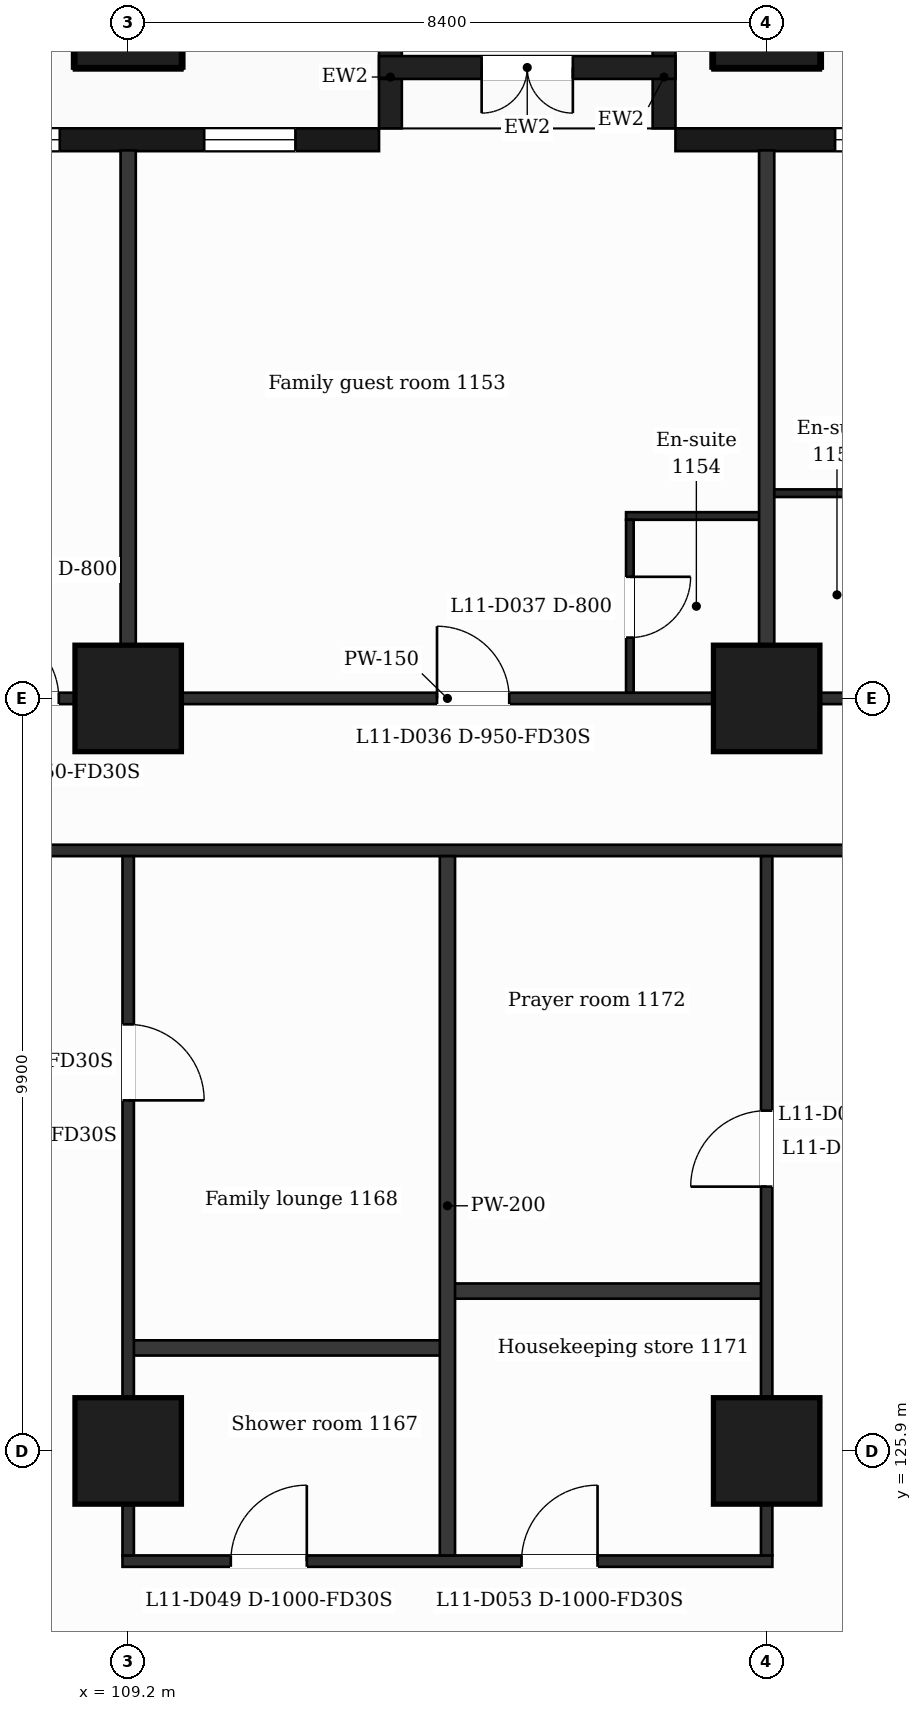
"""IFC4 building model, lengths in metres.
Left out: names, types, materials, properties, quantities, classifications, styles, units other than length and angle.
Written with IfcOpenShell. Run it as: python <this file> out.ifc"""

import sys

from ifc_helpers import new_model, si_unit, direction, frame, frame_2d, origin, origin_2d, place, context, subcontext, project, spatial, rectangle, extrude, element, fill, save


model = new_model("IFC4")
c1 = context("Model", 3, precision=1e-05, world=origin(), true_north=direction((0.0, 1.0)))
c2 = subcontext(c1, "Body", "Model", "MODEL_VIEW")
j1 = project(units=[si_unit("LENGTHUNIT", "METRE"), si_unit("PLANEANGLEUNIT", "RADIAN")], contexts=[c1])
p1 = place(None, origin())
s1 = spatial("IfcSite", under=j1, at=p1, CompositionType="ELEMENT")
p2 = place(p1, origin())
s2 = spatial("IfcBuilding", under=s1, at=p2, CompositionType="ELEMENT")
p3 = place(p2, frame((0.0, 0.0, 56.5)))
s3 = spatial("IfcBuildingStorey", under=s2, at=p3, CompositionType="ELEMENT", Elevation=56.5)
for number, where, z_axis, x_axis in (
    (1, (109.2, 125.9, 0.0), (0.0, 0.0, 1.0), (1.0, 0.0, 0.0)),
    (2, (117.6, 125.9, 0.0), (0.0, 0.0, 1.0), (1.0, 0.0, 0.0)),
    (3, (109.2, 135.8, 0.0), (0.0, 0.0, 1.0), (1.0, 0.0, 0.0)),
    (4, (117.6, 135.8, 0.0), (0.0, 0.0, 1.0), (1.0, 0.0, 0.0)),
    (5, (109.2, 144.8, 0.0), (0.0, 0.0, 1.0), (1.0, 0.0, 0.0)),
    (6, (117.6, 144.8, 0.0), (0.0, 0.0, 1.0), (1.0, 0.0, 0.0)),
):
    element("IfcColumn", number, at=place(p3, frame(where, z_axis=z_axis, x_axis=x_axis)), inside=s3, PredefinedType="COLUMN", context=c2, shape_type="SweptSolid", body=[
        extrude(rectangle(XDim=1.4, YDim=1.4, at=origin_2d()), origin(), (0.0, 0.0, 1.0), 3.5),
    ])
p4 = place(p3, frame((130.65, 143.15, 0.0), z_axis=(0.0, 0.0, 1.0), x_axis=(-1.0, 0.0, 0.0)))
e7 = element("IfcWall", 7, at=p4, inside=s3, PredefinedType="SOLIDWALL", context=c2, shape_type="SweptSolid", body=[
    extrude(rectangle(XDim=14.25, YDim=0.3, at=frame_2d((7.125, 0.0))), origin(), (0.0, 0.0, 1.0), 3.18),
])
p5 = place(p4, frame((1.35, 0.0, 0.9)))
e8 = element("IfcOpeningElement", 8, at=p5, cuts=e7, PredefinedType="OPENING", context=c2, shape_type="SweptSolid", body=[
    extrude(rectangle(XDim=2.4, YDim=2.1, at=frame_2d((1.2, 1.05))), frame((0.0, 0.16, 0.0), z_axis=(0.0, -1.0, 0.0), x_axis=(1.0, 0.0, 0.0)), (0.0, 0.0, 1.0), 0.32),
])
p6 = place(p4, frame((6.15, 0.0, 0.0)))
e9 = element("IfcOpeningElement", 9, at=p6, cuts=e7, PredefinedType="OPENING", context=c2, shape_type="SweptSolid", body=[
    extrude(rectangle(XDim=1.2, YDim=2.4, at=frame_2d((0.6, 1.2))), frame((0.0, 0.16, 0.0), z_axis=(0.0, -1.0, 0.0), x_axis=(1.0, 0.0, 0.0)), (0.0, 0.0, 1.0), 0.32),
])
p7 = place(p4, frame((9.75, 0.0, 0.9)))
e10 = element("IfcOpeningElement", 10, at=p7, cuts=e7, PredefinedType="OPENING", context=c2, shape_type="SweptSolid", body=[
    extrude(rectangle(XDim=2.4, YDim=2.1, at=frame_2d((1.2, 1.05))), frame((0.0, 0.16, 0.0), z_axis=(0.0, -1.0, 0.0), x_axis=(1.0, 0.0, 0.0)), (0.0, 0.0, 1.0), 0.32),
])
p8 = place(p3, frame((112.5, 143.15, 0.0), z_axis=(0.0, 0.0, 1.0), x_axis=(-1.0, 0.0, 0.0)))
e11 = element("IfcWall", 11, at=p8, inside=s3, PredefinedType="SOLIDWALL", context=c2, shape_type="SweptSolid", body=[
    extrude(rectangle(XDim=16.5, YDim=0.3, at=frame_2d((8.25, 0.0))), origin(), (0.0, 0.0, 1.0), 3.18),
])
p9 = place(p8, frame((1.1, 0.0, 0.9)))
e12 = element("IfcOpeningElement", 12, at=p9, cuts=e11, PredefinedType="OPENING", context=c2, shape_type="SweptSolid", body=[
    extrude(rectangle(XDim=1.2, YDim=2.1, at=frame_2d((0.6, 1.05))), frame((0.0, 0.16, 0.0), z_axis=(0.0, -1.0, 0.0), x_axis=(1.0, 0.0, 0.0)), (0.0, 0.0, 1.0), 0.32),
])
p10 = place(p8, frame((4.2, 0.0, 0.9)))
e13 = element("IfcOpeningElement", 13, at=p10, cuts=e11, PredefinedType="OPENING", context=c2, shape_type="SweptSolid", body=[
    extrude(rectangle(XDim=2.4, YDim=2.1, at=frame_2d((1.2, 1.05))), frame((0.0, 0.16, 0.0), z_axis=(0.0, -1.0, 0.0), x_axis=(1.0, 0.0, 0.0)), (0.0, 0.0, 1.0), 0.32),
])
p11 = place(p8, frame((9.0, 0.0, 0.0)))
e14 = element("IfcOpeningElement", 14, at=p11, cuts=e11, PredefinedType="OPENING", context=c2, shape_type="SweptSolid", body=[
    extrude(rectangle(XDim=1.2, YDim=2.4, at=frame_2d((0.6, 1.2))), frame((0.0, 0.16, 0.0), z_axis=(0.0, -1.0, 0.0), x_axis=(1.0, 0.0, 0.0)), (0.0, 0.0, 1.0), 0.32),
])
p12 = place(p8, frame((12.3, 0.0, 0.9)))
e15 = element("IfcOpeningElement", 15, at=p12, cuts=e11, PredefinedType="OPENING", context=c2, shape_type="SweptSolid", body=[
    extrude(rectangle(XDim=1.2, YDim=2.1, at=frame_2d((0.6, 1.05))), frame((0.0, 0.16, 0.0), z_axis=(0.0, -1.0, 0.0), x_axis=(1.0, 0.0, 0.0)), (0.0, 0.0, 1.0), 0.32),
])
p13 = place(p8, frame((14.1, 0.0, 0.9)))
e16 = element("IfcOpeningElement", 16, at=p13, cuts=e11, PredefinedType="OPENING", context=c2, shape_type="SweptSolid", body=[
    extrude(rectangle(XDim=1.2, YDim=2.1, at=frame_2d((0.6, 1.05))), frame((0.0, 0.16, 0.0), z_axis=(0.0, -1.0, 0.0), x_axis=(1.0, 0.0, 0.0)), (0.0, 0.0, 1.0), 0.32),
])
for number, where, z_axis, x_axis in (
    (17, (116.25, 143.3, 0.0), (0.0, 0.0, 1.0), (0.0, 1.0, 0.0)),
    (18, (112.65, 143.3, 0.0), (0.0, 0.0, 1.0), (0.0, 1.0, 0.0)),
):
    element("IfcWall", number, at=place(p3, frame(where, z_axis=z_axis, x_axis=x_axis)), inside=s3, PredefinedType="SOLIDWALL", context=c2, shape_type="SweptSolid", body=[
        extrude(rectangle(XDim=1.35, YDim=0.3, at=frame_2d((0.675, 0.0))), origin(), (0.0, 0.0, 1.0), 3.18),
    ])
p14 = place(p3, frame((116.4, 144.1, 0.0), z_axis=(0.0, 0.0, 1.0), x_axis=(-1.0, 0.0, 0.0)))
e19 = element("IfcWall", 19, at=p14, inside=s3, PredefinedType="SOLIDWALL", context=c2, shape_type="SweptSolid", body=[
    extrude(rectangle(XDim=3.9, YDim=0.3, at=frame_2d((1.95, 0.0))), origin(), (0.0, 0.0, 1.0), 3.18),
])
p15 = place(p14, frame((1.35, 0.0, 0.0)))
e20 = element("IfcOpeningElement", 20, at=p15, cuts=e19, PredefinedType="OPENING", context=c2, shape_type="SweptSolid", body=[
    extrude(rectangle(XDim=1.2, YDim=2.4, at=frame_2d((0.6, 1.2))), frame((0.0, 0.16, 0.0), z_axis=(0.0, -1.0, 0.0), x_axis=(1.0, 0.0, 0.0)), (0.0, 0.0, 1.0), 0.32),
])
p16 = place(p3, frame((109.125, 124.45, 0.0), z_axis=(0.0, 0.0, 1.0), x_axis=(1.0, 0.0, 0.0)))
e21 = element("IfcWall", 21, at=p16, inside=s3, PredefinedType="PARTITIONING", context=c2, shape_type="SweptSolid", body=[
    extrude(rectangle(XDim=8.55, YDim=0.15, at=frame_2d((4.275, 0.0))), origin(), (0.0, 0.0, 1.0), 3.18),
])
p17 = place(p16, frame((1.425, 0.0, 0.0)))
e22 = element("IfcOpeningElement", 22, at=p17, cuts=e21, PredefinedType="OPENING", context=c2, shape_type="SweptSolid", body=[
    extrude(rectangle(XDim=1.0, YDim=2.1, at=frame_2d((0.5, 1.05))), frame((0.0, 0.085, 0.0), z_axis=(0.0, -1.0, 0.0), x_axis=(1.0, 0.0, 0.0)), (0.0, 0.0, 1.0), 0.17),
])
p18 = place(p16, frame((5.25, 0.0, 0.0)))
e23 = element("IfcOpeningElement", 23, at=p18, cuts=e21, PredefinedType="OPENING", context=c2, shape_type="SweptSolid", body=[
    extrude(rectangle(XDim=1.0, YDim=2.1, at=frame_2d((0.5, 1.05))), frame((0.0, 0.085, 0.0), z_axis=(0.0, -1.0, 0.0), x_axis=(1.0, 0.0, 0.0)), (0.0, 0.0, 1.0), 0.17),
])
p19 = place(p3, frame((109.2, 127.255, 0.0), z_axis=(0.0, 0.0, 1.0), x_axis=(1.0, 0.0, 0.0)))
e24 = element("IfcWall", 24, at=p19, inside=s3, PredefinedType="PARTITIONING", context=c2, shape_type="SweptSolid", body=[
    extrude(rectangle(XDim=4.2, YDim=0.2, at=frame_2d((2.1, 0.0))), origin(), (0.0, 0.0, 1.0), 3.18),
])
p20 = place(p3, frame((113.4, 128.003, 0.0), z_axis=(0.0, 0.0, 1.0), x_axis=(1.0, 0.0, 0.0)))
e25 = element("IfcWall", 25, at=p20, inside=s3, PredefinedType="PARTITIONING", context=c2, shape_type="SweptSolid", body=[
    extrude(rectangle(XDim=4.2, YDim=0.2, at=frame_2d((2.1, 0.0))), origin(), (0.0, 0.0, 1.0), 3.18),
])
p21 = place(p3, frame((100.725, 133.8, 0.0), z_axis=(0.0, 0.0, 1.0), x_axis=(1.0, 0.0, 0.0)))
e26 = element("IfcWall", 26, at=p21, inside=s3, PredefinedType="PARTITIONING", context=c2, shape_type="SweptSolid", body=[
    extrude(rectangle(XDim=25.35, YDim=0.15, at=frame_2d((12.675, 0.0))), origin(), (0.0, 0.0, 1.0), 3.18),
])
p22 = place(p3, frame((90.895, 135.8, 0.0), z_axis=(0.0, 0.0, 1.0), x_axis=(1.0, 0.0, 0.0)))
e27 = element("IfcWall", 27, at=p22, inside=s3, PredefinedType="PARTITIONING", context=c2, shape_type="SweptSolid", body=[
    extrude(rectangle(XDim=45.011, YDim=0.15, at=frame_2d((22.505, 0.0))), origin(), (0.0, 0.0, 1.0), 3.18),
])
p23 = place(p22, frame((7.675, 0.0, 0.0)))
e28 = element("IfcOpeningElement", 28, at=p23, cuts=e27, PredefinedType="OPENING", context=c2, shape_type="SweptSolid", body=[
    extrude(rectangle(XDim=1.0, YDim=2.1, at=frame_2d((0.5, 1.05))), frame((0.0, 0.085, 0.0), z_axis=(0.0, -1.0, 0.0), x_axis=(1.0, 0.0, 0.0)), (0.0, 0.0, 1.0), 0.17),
])
p24 = place(p22, frame((10.892, 0.0, 0.0)))
e29 = element("IfcOpeningElement", 29, at=p24, cuts=e27, PredefinedType="OPENING", context=c2, shape_type="SweptSolid", body=[
    extrude(rectangle(XDim=0.95, YDim=2.1, at=frame_2d((0.475, 1.05))), frame((0.0, 0.085, 0.0), z_axis=(0.0, -1.0, 0.0), x_axis=(1.0, 0.0, 0.0)), (0.0, 0.0, 1.0), 0.17),
])
p25 = place(p22, frame((16.442, 0.0, 0.0)))
e30 = element("IfcOpeningElement", 30, at=p25, cuts=e27, PredefinedType="OPENING", context=c2, shape_type="SweptSolid", body=[
    extrude(rectangle(XDim=0.95, YDim=2.1, at=frame_2d((0.475, 1.05))), frame((0.0, 0.085, 0.0), z_axis=(0.0, -1.0, 0.0), x_axis=(1.0, 0.0, 0.0)), (0.0, 0.0, 1.0), 0.17),
])
p26 = place(p22, frame((22.368, 0.0, 0.0)))
e31 = element("IfcOpeningElement", 31, at=p26, cuts=e27, PredefinedType="OPENING", context=c2, shape_type="SweptSolid", body=[
    extrude(rectangle(XDim=0.95, YDim=2.1, at=frame_2d((0.475, 1.05))), frame((0.0, 0.085, 0.0), z_axis=(0.0, -1.0, 0.0), x_axis=(1.0, 0.0, 0.0)), (0.0, 0.0, 1.0), 0.17),
])
p27 = place(p22, frame((31.825, 0.0, 0.0)))
e32 = element("IfcOpeningElement", 32, at=p27, cuts=e27, PredefinedType="OPENING", context=c2, shape_type="SweptSolid", body=[
    extrude(rectangle(XDim=0.95, YDim=2.1, at=frame_2d((0.475, 1.05))), frame((0.0, 0.085, 0.0), z_axis=(0.0, -1.0, 0.0), x_axis=(1.0, 0.0, 0.0)), (0.0, 0.0, 1.0), 0.17),
])
p28 = place(p22, frame((36.775, 0.0, 0.0)))
e33 = element("IfcOpeningElement", 33, at=p28, cuts=e27, PredefinedType="OPENING", context=c2, shape_type="SweptSolid", body=[
    extrude(rectangle(XDim=1.0, YDim=2.1, at=frame_2d((0.5, 1.05))), frame((0.0, 0.085, 0.0), z_axis=(0.0, -1.0, 0.0), x_axis=(1.0, 0.0, 0.0)), (0.0, 0.0, 1.0), 0.17),
])
p29 = place(p3, frame((115.75, 138.2, 0.0), z_axis=(0.0, 0.0, 1.0), x_axis=(1.0, 0.0, 0.0)))
e34 = element("IfcWall", 34, at=p29, inside=s3, PredefinedType="PARTITIONING", context=c2, shape_type="SweptSolid", body=[
    extrude(rectangle(XDim=1.85, YDim=0.1, at=frame_2d((0.925, 0.0))), origin(), (0.0, 0.0, 1.0), 3.18),
])
p30 = place(p3, frame((117.6, 138.5, 0.0), z_axis=(0.0, 0.0, 1.0), x_axis=(1.0, 0.0, 0.0)))
e35 = element("IfcWall", 35, at=p30, inside=s3, PredefinedType="PARTITIONING", context=c2, shape_type="SweptSolid", body=[
    extrude(rectangle(XDim=1.85, YDim=0.1, at=frame_2d((0.925, 0.0))), origin(), (0.0, 0.0, 1.0), 3.18),
])
p31 = place(p3, frame((109.2, 135.875, 0.0), z_axis=(0.0, 0.0, 1.0), x_axis=(0.0, 1.0, 0.0)))
e36 = element("IfcWall", 36, at=p31, inside=s3, PredefinedType="PARTITIONING", context=c2, shape_type="SweptSolid", body=[
    extrude(rectangle(XDim=7.135, YDim=0.2, at=frame_2d((3.567, 0.0))), origin(), (0.0, 0.0, 1.0), 3.18),
])
p32 = place(p3, frame((109.2, 124.525, 0.0), z_axis=(0.0, 0.0, 1.0), x_axis=(0.0, 1.0, 0.0)))
e37 = element("IfcWall", 37, at=p32, inside=s3, PredefinedType="PARTITIONING", context=c2, shape_type="SweptSolid", body=[
    extrude(rectangle(XDim=9.2, YDim=0.15, at=frame_2d((4.6, 0.0))), origin(), (0.0, 0.0, 1.0), 3.18),
])
p33 = place(p32, frame((5.987, 0.0, 0.0)))
e38 = element("IfcOpeningElement", 38, at=p33, cuts=e37, PredefinedType="OPENING", context=c2, shape_type="SweptSolid", body=[
    extrude(rectangle(XDim=1.0, YDim=2.1, at=frame_2d((0.5, 1.05))), frame((0.0, 0.085, 0.0), z_axis=(0.0, -1.0, 0.0), x_axis=(1.0, 0.0, 0.0)), (0.0, 0.0, 1.0), 0.17),
])
p34 = place(p3, frame((113.4, 124.525, 0.0), z_axis=(0.0, 0.0, 1.0), x_axis=(0.0, 1.0, 0.0)))
e39 = element("IfcWall", 39, at=p34, inside=s3, PredefinedType="PARTITIONING", context=c2, shape_type="SweptSolid", body=[
    extrude(rectangle(XDim=9.2, YDim=0.2, at=frame_2d((4.6, 0.0))), origin(), (0.0, 0.0, 1.0), 3.18),
])
p35 = place(p3, frame((115.8, 135.875, 0.0), z_axis=(0.0, 0.0, 1.0), x_axis=(0.0, 1.0, 0.0)))
e40 = element("IfcWall", 40, at=p35, inside=s3, PredefinedType="PARTITIONING", context=c2, shape_type="SweptSolid", body=[
    extrude(rectangle(XDim=2.275, YDim=0.1, at=frame_2d((1.137, 0.0))), origin(), (0.0, 0.0, 1.0), 3.18),
])
p36 = place(p35, frame((0.725, 0.0, 0.0)))
e41 = element("IfcOpeningElement", 41, at=p36, cuts=e40, PredefinedType="OPENING", context=c2, shape_type="SweptSolid", body=[
    extrude(rectangle(XDim=0.8, YDim=2.1, at=frame_2d((0.4, 1.05))), frame((0.0, 0.06, 0.0), z_axis=(0.0, -1.0, 0.0), x_axis=(1.0, 0.0, 0.0)), (0.0, 0.0, 1.0), 0.12),
])
p37 = place(p3, frame((117.6, 135.875, 0.0), z_axis=(0.0, 0.0, 1.0), x_axis=(0.0, 1.0, 0.0)))
e42 = element("IfcWall", 42, at=p37, inside=s3, PredefinedType="PARTITIONING", context=c2, shape_type="SweptSolid", body=[
    extrude(rectangle(XDim=7.135, YDim=0.2, at=frame_2d((3.567, 0.0))), origin(), (0.0, 0.0, 1.0), 3.18),
])
p38 = place(p3, frame((117.6, 124.525, 0.0), z_axis=(0.0, 0.0, 1.0), x_axis=(0.0, 1.0, 0.0)))
e43 = element("IfcWall", 43, at=p38, inside=s3, PredefinedType="PARTITIONING", context=c2, shape_type="SweptSolid", body=[
    extrude(rectangle(XDim=9.2, YDim=0.15, at=frame_2d((4.6, 0.0))), origin(), (0.0, 0.0, 1.0), 3.18),
])
p39 = place(p38, frame((4.852, 0.0, 0.0)))
e44 = element("IfcOpeningElement", 44, at=p39, cuts=e43, PredefinedType="OPENING", context=c2, shape_type="SweptSolid", body=[
    extrude(rectangle(XDim=1.0, YDim=2.1, at=frame_2d((0.5, 1.05))), frame((0.0, 0.085, 0.0), z_axis=(0.0, -1.0, 0.0), x_axis=(1.0, 0.0, 0.0)), (0.0, 0.0, 1.0), 0.17),
])
p40 = place(p7, origin())
e45 = element("IfcWindow", 45, at=p40, inside=s3, PartitioningType="SINGLE_PANEL", PredefinedType="WINDOW", context=c2, shape_type="SweptSolid", body=[
    extrude(rectangle(XDim=2.4, YDim=2.1, at=frame_2d((1.2, 1.05))), frame((0.0, 0.03, 0.0), z_axis=(0.0, -1.0, 0.0), x_axis=(1.0, 0.0, 0.0)), (0.0, 0.0, 1.0), 0.06),
])
fill(e10, e45)
p41 = place(p9, origin())
e46 = element("IfcWindow", 46, at=p41, inside=s3, PartitioningType="SINGLE_PANEL", PredefinedType="WINDOW", context=c2, shape_type="SweptSolid", body=[
    extrude(rectangle(XDim=1.2, YDim=2.1, at=frame_2d((0.6, 1.05))), frame((0.0, 0.03, 0.0), z_axis=(0.0, -1.0, 0.0), x_axis=(1.0, 0.0, 0.0)), (0.0, 0.0, 1.0), 0.06),
])
fill(e12, e46)
p42 = place(p10, origin())
e47 = element("IfcWindow", 47, at=p42, inside=s3, PartitioningType="SINGLE_PANEL", PredefinedType="WINDOW", context=c2, shape_type="SweptSolid", body=[
    extrude(rectangle(XDim=2.4, YDim=2.1, at=frame_2d((1.2, 1.05))), frame((0.0, 0.03, 0.0), z_axis=(0.0, -1.0, 0.0), x_axis=(1.0, 0.0, 0.0)), (0.0, 0.0, 1.0), 0.06),
])
fill(e13, e47)
p43 = place(p15, origin())
e48 = element("IfcDoor", 48, at=p43, inside=s3, OperationType="DOUBLE_DOOR_SINGLE_SWING", PredefinedType="DOOR", context=c2, shape_type="SweptSolid", body=[
    extrude(rectangle(XDim=1.2, YDim=2.4, at=frame_2d((0.6, 1.2))), frame((0.0, 0.025, 0.0), z_axis=(0.0, -1.0, 0.0), x_axis=(1.0, 0.0, 0.0)), (0.0, 0.0, 1.0), 0.05),
])
fill(e20, e48)
p44 = place(p25, origin())
e49 = element("IfcDoor", 49, at=p44, inside=s3, OperationType="SINGLE_SWING_LEFT", PredefinedType="DOOR", context=c2, shape_type="SweptSolid", body=[
    extrude(rectangle(XDim=0.95, YDim=2.1, at=frame_2d((0.475, 1.05))), frame((0.0, 0.025, 0.0), z_axis=(0.0, -1.0, 0.0), x_axis=(1.0, 0.0, 0.0)), (0.0, 0.0, 1.0), 0.05),
])
fill(e30, e49)
p45 = place(p26, origin())
e50 = element("IfcDoor", 50, at=p45, inside=s3, OperationType="SINGLE_SWING_LEFT", PredefinedType="DOOR", context=c2, shape_type="SweptSolid", body=[
    extrude(rectangle(XDim=0.95, YDim=2.1, at=frame_2d((0.475, 1.05))), frame((0.0, 0.025, 0.0), z_axis=(0.0, -1.0, 0.0), x_axis=(1.0, 0.0, 0.0)), (0.0, 0.0, 1.0), 0.05),
])
fill(e31, e50)
p46 = place(p36, origin())
e51 = element("IfcDoor", 51, at=p46, inside=s3, OperationType="SINGLE_SWING_RIGHT", PredefinedType="DOOR", context=c2, shape_type="SweptSolid", body=[
    extrude(rectangle(XDim=0.8, YDim=2.1, at=frame_2d((0.4, 1.05))), frame((0.0, 0.025, 0.0), z_axis=(0.0, -1.0, 0.0), x_axis=(1.0, 0.0, 0.0)), (0.0, 0.0, 1.0), 0.05),
])
fill(e41, e51)
p47 = place(p17, origin())
e52 = element("IfcDoor", 52, at=p47, inside=s3, OperationType="SINGLE_SWING_RIGHT", PredefinedType="DOOR", context=c2, shape_type="SweptSolid", body=[
    extrude(rectangle(XDim=1.0, YDim=2.1, at=frame_2d((0.5, 1.05))), frame((0.0, 0.025, 0.0), z_axis=(0.0, -1.0, 0.0), x_axis=(1.0, 0.0, 0.0)), (0.0, 0.0, 1.0), 0.05),
])
fill(e22, e52)
p48 = place(p33, origin())
e53 = element("IfcDoor", 53, at=p48, inside=s3, OperationType="SINGLE_SWING_LEFT", PredefinedType="DOOR", context=c2, shape_type="SweptSolid", body=[
    extrude(rectangle(XDim=1.0, YDim=2.1, at=frame_2d((0.5, 1.05))), frame((0.0, 0.025, 0.0), z_axis=(0.0, -1.0, 0.0), x_axis=(1.0, 0.0, 0.0)), (0.0, 0.0, 1.0), 0.05),
])
fill(e38, e53)
p49 = place(p18, origin())
e54 = element("IfcDoor", 54, at=p49, inside=s3, OperationType="SINGLE_SWING_RIGHT", PredefinedType="DOOR", context=c2, shape_type="SweptSolid", body=[
    extrude(rectangle(XDim=1.0, YDim=2.1, at=frame_2d((0.5, 1.05))), frame((0.0, 0.025, 0.0), z_axis=(0.0, -1.0, 0.0), x_axis=(1.0, 0.0, 0.0)), (0.0, 0.0, 1.0), 0.05),
])
fill(e23, e54)
p50 = place(p39, origin())
e55 = element("IfcDoor", 55, at=p50, inside=s3, OperationType="SINGLE_SWING_LEFT", PredefinedType="DOOR", context=c2, shape_type="SweptSolid", body=[
    extrude(rectangle(XDim=1.0, YDim=2.1, at=frame_2d((0.5, 1.05))), frame((0.0, 0.025, 0.0), z_axis=(0.0, -1.0, 0.0), x_axis=(1.0, 0.0, 0.0)), (0.0, 0.0, 1.0), 0.05),
])
fill(e44, e55)
save(model, sys.argv[1])
